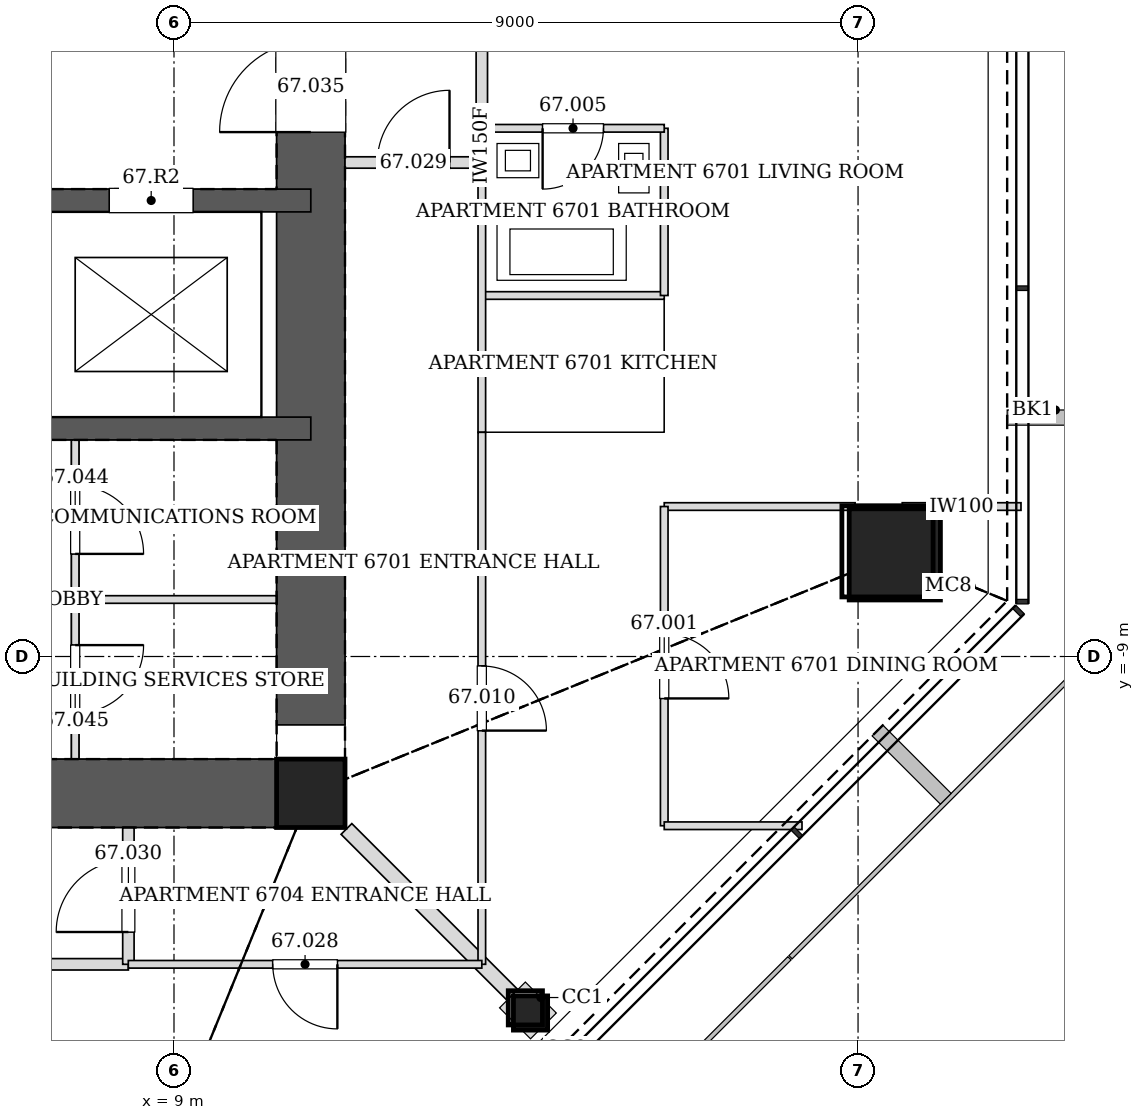
"""IFC4 building model, lengths in metres.
Left out: names, types, materials, properties, quantities, classifications, styles, units other than length and angle.
Written with IfcOpenShell. Run it as: python <this file> out.ifc"""

import sys

from ifc_helpers import new_model, si_unit, direction, frame, frame_2d, origin, origin_2d, place, context, subcontext, project, spatial, rectangle, hollow_rectangle, extrude, element, fill, save


model = new_model("IFC4")
c1 = context("Model", 3, precision=1e-05, world=origin(), true_north=direction((0.0, 1.0)))
c2 = subcontext(c1, "Body", "Model", "MODEL_VIEW")
j1 = project(units=[si_unit("LENGTHUNIT", "METRE"), si_unit("PLANEANGLEUNIT", "RADIAN")], contexts=[c1])
p1 = place(None, origin())
s1 = spatial("IfcSite", under=j1, at=p1, CompositionType="ELEMENT")
p2 = place(p1, origin())
s2 = spatial("IfcBuilding", under=s1, at=p2, CompositionType="ELEMENT")
p3 = place(p2, frame((0.0, 0.0, 277.6)))
s3 = spatial("IfcBuildingStorey", under=s2, at=p3, CompositionType="ELEMENT", Elevation=277.6)
p4 = place(p3, frame((18.484, -7.656, 0.0), z_axis=(-0.028279126691, 0.011771007049, 0.999530757099), x_axis=(-0.3842825994, -0.923215513192, 0.0)))
e1 = element("IfcColumn", 1, at=p4, inside=s3, PredefinedType="COLUMN", context=c2, shape_type="SweptSolid", body=[
    extrude(hollow_rectangle(XDim=1.2, YDim=1.2, WallThickness=0.055, at=origin_2d()), origin(), (0.0, 0.0, 1.0), 3.402),
])
p5 = place(p3, frame((13.691, -13.691, 0.0), z_axis=(-0.020026431307, 0.020026431307, 0.999598861593), x_axis=(-0.707106781187, -0.707106781187, 0.0)))
e2 = element("IfcColumn", 2, at=p5, inside=s3, PredefinedType="COLUMN", context=c2, shape_type="SweptSolid", body=[
    extrude(hollow_rectangle(XDim=0.45, YDim=0.45, WallThickness=0.02, at=origin_2d()), origin(), (0.0, 0.0, 1.0), 3.401),
])
p6 = place(p3, frame((10.8, -10.8, 0.0), z_axis=(0.0, 0.0, 1.0), x_axis=(1.0, 0.0, 0.0)))
e3 = element("IfcColumn", 3, at=p6, inside=s3, PredefinedType="COLUMN", context=c2, shape_type="SweptSolid", body=[
    extrude(hollow_rectangle(XDim=0.9, YDim=0.9, WallThickness=0.04, at=origin_2d()), origin(), (0.0, 0.0, 1.0), 3.4),
])
p7 = place(p3, frame((-10.8, -10.8, 0.0), z_axis=(0.0, 0.0, 1.0), x_axis=(1.0, 0.0, 0.0)))
e4 = element("IfcWall", 4, at=p7, inside=s3, PredefinedType="SOLIDWALL", context=c2, shape_type="SweptSolid", body=[
    extrude(rectangle(XDim=21.6, YDim=0.9, at=frame_2d((10.8, 0.0))), origin(), (0.0, 0.0, 1.0), 3.4),
])
p8 = place(p7, frame((10.05, 0.0, 0.0)))
e5 = element("IfcOpeningElement", 5, at=p8, cuts=e4, PredefinedType="OPENING", context=c2, shape_type="SweptSolid", body=[
    extrude(rectangle(XDim=1.5, YDim=2.1, at=frame_2d((0.75, 1.05))), frame((0.0, 0.46, 0.0), z_axis=(0.0, -1.0, 0.0), x_axis=(1.0, 0.0, 0.0)), (0.0, 0.0, 1.0), 0.92),
])
p9 = place(p7, frame((17.1, 0.0, 0.0)))
e6 = element("IfcOpeningElement", 6, at=p9, cuts=e4, PredefinedType="OPENING", context=c2, shape_type="SweptSolid", body=[
    extrude(rectangle(XDim=0.9, YDim=2.1, at=frame_2d((0.45, 1.05))), frame((0.0, 0.46, 0.0), z_axis=(0.0, -1.0, 0.0), x_axis=(1.0, 0.0, 0.0)), (0.0, 0.0, 1.0), 0.92),
])
p10 = place(p3, frame((10.8, -10.8, 0.0), z_axis=(0.0, 0.0, 1.0), x_axis=(0.0, 1.0, 0.0)))
e7 = element("IfcWall", 7, at=p10, inside=s3, PredefinedType="SOLIDWALL", context=c2, shape_type="SweptSolid", body=[
    extrude(rectangle(XDim=21.6, YDim=0.9, at=frame_2d((10.8, 0.0))), origin(), (0.0, 0.0, 1.0), 3.4),
])
p11 = place(p10, frame((11.7, 0.0, 0.0)))
e8 = element("IfcOpeningElement", 8, at=p11, cuts=e7, PredefinedType="OPENING", context=c2, shape_type="SweptSolid", body=[
    extrude(rectangle(XDim=1.2, YDim=2.1, at=frame_2d((0.6, 1.05))), frame((0.0, 0.46, 0.0), z_axis=(0.0, -1.0, 0.0), x_axis=(1.0, 0.0, 0.0)), (0.0, 0.0, 1.0), 0.92),
])
p12 = place(p10, frame((8.7, 0.0, 0.0)))
e9 = element("IfcOpeningElement", 9, at=p12, cuts=e7, PredefinedType="OPENING", context=c2, shape_type="SweptSolid", body=[
    extrude(rectangle(XDim=1.2, YDim=2.1, at=frame_2d((0.6, 1.05))), frame((0.0, 0.46, 0.0), z_axis=(0.0, -1.0, 0.0), x_axis=(1.0, 0.0, 0.0)), (0.0, 0.0, 1.0), 0.92),
])
p13 = place(p3, frame((-10.8, -3.0, 0.0), z_axis=(0.0, 0.0, 1.0), x_axis=(1.0, 0.0, 0.0)))
e10 = element("IfcWall", 10, at=p13, inside=s3, PredefinedType="SOLIDWALL", context=c2, shape_type="SweptSolid", body=[
    extrude(rectangle(XDim=21.6, YDim=0.3, at=frame_2d((10.8, 0.0))), origin(), (0.0, 0.0, 1.0), 3.4),
])
p14 = place(p13, frame((4.55, 0.0, 0.0)))
e11 = element("IfcOpeningElement", 11, at=p14, cuts=e10, PredefinedType="OPENING", context=c2, shape_type="SweptSolid", body=[
    extrude(rectangle(XDim=0.9, YDim=2.1, at=frame_2d((0.45, 1.05))), frame((0.0, 0.16, 0.0), z_axis=(0.0, -1.0, 0.0), x_axis=(1.0, 0.0, 0.0)), (0.0, 0.0, 1.0), 0.32),
])
p15 = place(p13, frame((7.45, 0.0, 0.0)))
e12 = element("IfcOpeningElement", 12, at=p15, cuts=e10, PredefinedType="OPENING", context=c2, shape_type="SweptSolid", body=[
    extrude(rectangle(XDim=0.9, YDim=2.1, at=frame_2d((0.45, 1.05))), frame((0.0, 0.16, 0.0), z_axis=(0.0, -1.0, 0.0), x_axis=(1.0, 0.0, 0.0)), (0.0, 0.0, 1.0), 0.32),
])
p16 = place(p13, frame((1.65, 0.0, 0.0)))
e13 = element("IfcOpeningElement", 13, at=p16, cuts=e10, PredefinedType="OPENING", context=c2, shape_type="SweptSolid", body=[
    extrude(rectangle(XDim=0.9, YDim=2.1, at=frame_2d((0.45, 1.05))), frame((0.0, 0.16, 0.0), z_axis=(0.0, -1.0, 0.0), x_axis=(1.0, 0.0, 0.0)), (0.0, 0.0, 1.0), 0.32),
])
p17 = place(p13, frame((13.25, 0.0, 0.0)))
e14 = element("IfcOpeningElement", 14, at=p17, cuts=e10, PredefinedType="OPENING", context=c2, shape_type="SweptSolid", body=[
    extrude(rectangle(XDim=0.9, YDim=2.1, at=frame_2d((0.45, 1.05))), frame((0.0, 0.16, 0.0), z_axis=(0.0, -1.0, 0.0), x_axis=(1.0, 0.0, 0.0)), (0.0, 0.0, 1.0), 0.32),
])
p18 = place(p13, frame((16.05, 0.0, 0.0)))
e15 = element("IfcOpeningElement", 15, at=p18, cuts=e10, PredefinedType="OPENING", context=c2, shape_type="SweptSolid", body=[
    extrude(rectangle(XDim=1.1, YDim=2.1, at=frame_2d((0.55, 1.05))), frame((0.0, 0.16, 0.0), z_axis=(0.0, -1.0, 0.0), x_axis=(1.0, 0.0, 0.0)), (0.0, 0.0, 1.0), 0.32),
])
p19 = place(p13, frame((18.95, 0.0, 0.0)))
e16 = element("IfcOpeningElement", 16, at=p19, cuts=e10, PredefinedType="OPENING", context=c2, shape_type="SweptSolid", body=[
    extrude(rectangle(XDim=1.1, YDim=2.1, at=frame_2d((0.55, 1.05))), frame((0.0, 0.16, 0.0), z_axis=(0.0, -1.0, 0.0), x_axis=(1.0, 0.0, 0.0)), (0.0, 0.0, 1.0), 0.32),
])
p20 = place(p3, frame((-10.8, -6.0, 0.0), z_axis=(0.0, 0.0, 1.0), x_axis=(1.0, 0.0, 0.0)))
e17 = element("IfcWall", 17, at=p20, inside=s3, PredefinedType="SOLIDWALL", context=c2, shape_type="SweptSolid", body=[
    extrude(rectangle(XDim=21.6, YDim=0.3, at=frame_2d((10.8, 0.0))), origin(), (0.0, 0.0, 1.0), 3.4),
])
p21 = place(p20, frame((10.25, 0.0, 0.0)))
e18 = element("IfcOpeningElement", 18, at=p21, cuts=e17, PredefinedType="OPENING", context=c2, shape_type="SweptSolid", body=[
    extrude(rectangle(XDim=1.1, YDim=2.1, at=frame_2d((0.55, 1.05))), frame((0.0, 0.16, 0.0), z_axis=(0.0, -1.0, 0.0), x_axis=(1.0, 0.0, 0.0)), (0.0, 0.0, 1.0), 0.32),
])
p22 = place(p3, frame((13.05, -2.5, 0.0), z_axis=(0.0, 0.0, 1.0), x_axis=(0.0, 1.0, 0.0)))
e19 = element("IfcWall", 19, at=p22, inside=s3, PredefinedType="PARTITIONING", context=c2, shape_type="SweptSolid", body=[
    extrude(rectangle(XDim=0.451, YDim=0.15, at=frame_2d((0.226, 0.0))), origin(), (0.0, 0.0, 1.0), 3.2),
])
p23 = place(p3, frame((13.05, -2.051, 0.0), z_axis=(0.0, 0.0, 1.0), x_axis=(0.0, 1.0, 0.0)))
e20 = element("IfcWall", 20, at=p23, inside=s3, PredefinedType="PARTITIONING", context=c2, shape_type="SweptSolid", body=[
    extrude(rectangle(XDim=9.602, YDim=0.15, at=frame_2d((4.801, 0.0))), origin(), (0.0, 0.0, 1.0), 2.344),
])
p24 = place(p3, frame((11.25, -2.5, 0.0), z_axis=(0.0, 0.0, 1.0), x_axis=(1.0, 0.0, 0.0)))
e21 = element("IfcWall", 21, at=p24, inside=s3, PredefinedType="PARTITIONING", context=c2, shape_type="SweptSolid", body=[
    extrude(rectangle(XDim=1.8, YDim=0.15, at=frame_2d((0.9, 0.0))), origin(), (0.0, 0.0, 1.0), 3.2),
])
p25 = place(p24, frame((0.425, 0.0, 0.0)))
e22 = element("IfcOpeningElement", 22, at=p25, cuts=e21, PredefinedType="OPENING", context=c2, shape_type="SweptSolid", body=[
    extrude(rectangle(XDim=0.95, YDim=2.1, at=frame_2d((0.475, 1.05))), frame((0.0, 0.085, 0.0), z_axis=(0.0, -1.0, 0.0), x_axis=(1.0, 0.0, 0.0)), (0.0, 0.0, 1.0), 0.17),
])
p26 = place(p3, frame((6.049, -13.05, 0.0), z_axis=(0.0, 0.0, 1.0), x_axis=(1.0, 0.0, 0.0)))
e23 = element("IfcWall", 23, at=p26, inside=s3, PredefinedType="PARTITIONING", context=c2, shape_type="SweptSolid", body=[
    extrude(rectangle(XDim=2.351, YDim=0.15, at=frame_2d((1.175, 0.0))), origin(), (0.0, 0.0, 1.0), 3.2),
])
p27 = place(p3, frame((8.4, -13.05, 0.0), z_axis=(0.0, 0.0, 1.0), x_axis=(0.0, 1.0, 0.0)))
e24 = element("IfcWall", 24, at=p27, inside=s3, PredefinedType="PARTITIONING", context=c2, shape_type="SweptSolid", body=[
    extrude(rectangle(XDim=1.8, YDim=0.15, at=frame_2d((0.9, 0.0))), origin(), (0.0, 0.0, 1.0), 3.2),
])
p28 = place(p27, frame((0.425, 0.0, 0.0)))
e25 = element("IfcOpeningElement", 25, at=p28, cuts=e24, PredefinedType="OPENING", context=c2, shape_type="SweptSolid", body=[
    extrude(rectangle(XDim=0.95, YDim=2.1, at=frame_2d((0.475, 1.05))), frame((0.0, 0.085, 0.0), z_axis=(0.0, -1.0, 0.0), x_axis=(1.0, 0.0, 0.0)), (0.0, 0.0, 1.0), 0.17),
])
p29 = place(p3, frame((20.144, -7.027, 0.0), z_axis=(0.0, 0.0, 1.0), x_axis=(-1.0, 0.0, 0.0)))
e26 = element("IfcWall", 26, at=p29, inside=s3, PredefinedType="PARTITIONING", context=c2, shape_type="SweptSolid", body=[
    extrude(rectangle(XDim=1.562, YDim=0.1, at=frame_2d((0.781, 0.0))), origin(), (0.0, 0.0, 1.0), 3.2),
])
p30 = place(p3, frame((17.961, -7.027, 0.0), z_axis=(0.0, 0.0, 1.0), x_axis=(-1.0, 0.0, 0.0)))
e27 = element("IfcWall", 27, at=p30, inside=s3, PredefinedType="PARTITIONING", context=c2, shape_type="SweptSolid", body=[
    extrude(rectangle(XDim=2.511, YDim=0.1, at=frame_2d((1.256, 0.0))), origin(), (0.0, 0.0, 1.0), 2.591),
])
p31 = place(p3, frame((15.45, -7.027, 0.0), z_axis=(0.0, 0.0, 1.0), x_axis=(0.0, -1.0, 0.0)))
e28 = element("IfcWall", 28, at=p31, inside=s3, PredefinedType="PARTITIONING", context=c2, shape_type="SweptSolid", body=[
    extrude(rectangle(XDim=4.2, YDim=0.1, at=frame_2d((2.1, 0.0))), origin(), (0.0, 0.0, 1.0), 2.428),
])
p32 = place(p31, frame((1.675, 0.0, 0.0)))
e29 = element("IfcOpeningElement", 29, at=p32, cuts=e28, PredefinedType="OPENING", context=c2, shape_type="SweptSolid", body=[
    extrude(rectangle(XDim=0.85, YDim=2.1, at=frame_2d((0.425, 1.05))), frame((0.0, 0.06, 0.0), z_axis=(0.0, -1.0, 0.0), x_axis=(1.0, 0.0, 0.0)), (0.0, 0.0, 1.0), 0.12),
])
p33 = place(p3, frame((15.45, -11.227, 0.0), z_axis=(0.0, 0.0, 1.0), x_axis=(1.0, 0.0, 0.0)))
e30 = element("IfcWall", 30, at=p33, inside=s3, PredefinedType="PARTITIONING", context=c2, shape_type="SweptSolid", body=[
    extrude(rectangle(XDim=1.813, YDim=0.1, at=frame_2d((0.906, 0.0))), origin(), (0.0, 0.0, 1.0), 2.74),
])
p34 = place(p3, frame((15.45, -4.25, 0.0), z_axis=(0.0, 0.0, 1.0), x_axis=(-1.0, 0.0, 0.0)))
e31 = element("IfcWall", 31, at=p34, inside=s3, PredefinedType="PARTITIONING", context=c2, shape_type="SweptSolid", body=[
    extrude(rectangle(XDim=2.4, YDim=0.1, at=frame_2d((1.2, 0.0))), origin(), (0.0, 0.0, 1.0), 2.591),
])
p35 = place(p3, frame((13.05, -6.05, 0.0), z_axis=(0.0, 0.0, 1.0), x_axis=(0.0, 1.0, 0.0)))
e32 = element("IfcWall", 32, at=p35, inside=s3, PredefinedType="PARTITIONING", context=c2, shape_type="SweptSolid", body=[
    extrude(rectangle(XDim=3.551, YDim=0.1, at=frame_2d((1.775, 0.0))), origin(), (0.0, 0.0, 1.0), 3.2),
])
p36 = place(p3, frame((15.45, -4.25, 0.0), z_axis=(0.0, 0.0, 1.0), x_axis=(0.0, 1.0, 0.0)))
e33 = element("IfcWall", 33, at=p36, inside=s3, PredefinedType="PARTITIONING", context=c2, shape_type="SweptSolid", body=[
    extrude(rectangle(XDim=2.2, YDim=0.1, at=frame_2d((1.1, 0.0))), origin(), (0.0, 0.0, 1.0), 3.2),
])
p37 = place(p3, frame((15.45, -2.05, 0.0), z_axis=(0.0, 0.0, 1.0), x_axis=(-1.0, 0.0, 0.0)))
e34 = element("IfcWall", 34, at=p37, inside=s3, PredefinedType="PARTITIONING", context=c2, shape_type="SweptSolid", body=[
    extrude(rectangle(XDim=2.4, YDim=0.1, at=frame_2d((1.2, 0.0))), origin(), (0.0, 0.0, 1.0), 2.591),
])
p38 = place(p37, frame((0.8, 0.0, 0.0)))
e35 = element("IfcOpeningElement", 35, at=p38, cuts=e34, PredefinedType="OPENING", context=c2, shape_type="SweptSolid", body=[
    extrude(rectangle(XDim=0.8, YDim=2.1, at=frame_2d((0.4, 1.05))), frame((0.0, 0.06, 0.0), z_axis=(0.0, -1.0, 0.0), x_axis=(1.0, 0.0, 0.0)), (0.0, 0.0, 1.0), 0.12),
])
p39 = place(p3, frame((13.45, -13.45, 0.0), z_axis=(0.0, 0.0, 1.0), x_axis=(-0.707106781187, 0.707106781187, 0.0)))
e36 = element("IfcWall", 36, at=p39, inside=s3, PredefinedType="PARTITIONING", context=c2, shape_type="SweptSolid", body=[
    extrude(rectangle(XDim=3.085, YDim=0.2, at=frame_2d((1.542, 0.0))), origin(), (0.0, 0.0, 1.0), 2.591),
])
p40 = place(p3, frame((13.05, -6.05, 0.0), z_axis=(0.0, 0.0, 1.0), x_axis=(0.0, -1.0, 0.0)))
e37 = element("IfcWall", 37, at=p40, inside=s3, PredefinedType="PARTITIONING", context=c2, shape_type="SweptSolid", body=[
    extrude(rectangle(XDim=7.0, YDim=0.1, at=frame_2d((3.5, 0.0))), origin(), (0.0, 0.0, 1.0), 2.428),
])
p41 = place(p40, frame((3.075, 0.0, 0.0)))
e38 = element("IfcOpeningElement", 38, at=p41, cuts=e37, PredefinedType="OPENING", context=c2, shape_type="SweptSolid", body=[
    extrude(rectangle(XDim=0.85, YDim=2.1, at=frame_2d((0.425, 1.05))), frame((0.0, 0.06, 0.0), z_axis=(0.0, -1.0, 0.0), x_axis=(1.0, 0.0, 0.0)), (0.0, 0.0, 1.0), 0.12),
])
p42 = place(p3, frame((13.05, -13.05, 0.0), z_axis=(0.0, 0.0, 1.0), x_axis=(-1.0, 0.0, 0.0)))
e39 = element("IfcWall", 39, at=p42, inside=s3, PredefinedType="PARTITIONING", context=c2, shape_type="SweptSolid", body=[
    extrude(rectangle(XDim=4.651, YDim=0.1, at=frame_2d((2.326, 0.0))), origin(), (0.0, 0.0, 1.0), 2.428),
])
p43 = place(p42, frame((1.9, 0.0, 0.0)))
e40 = element("IfcOpeningElement", 40, at=p43, cuts=e39, PredefinedType="OPENING", context=c2, shape_type="SweptSolid", body=[
    extrude(rectangle(XDim=0.85, YDim=2.1, at=frame_2d((0.425, 1.05))), frame((0.0, 0.06, 0.0), z_axis=(0.0, -1.0, 0.0), x_axis=(1.0, 0.0, 0.0)), (0.0, 0.0, 1.0), 0.12),
])
p44 = place(p3, frame((7.7, -10.35, 0.0), z_axis=(0.0, 0.0, 1.0), x_axis=(0.0, 1.0, 0.0)))
e41 = element("IfcWall", 41, at=p44, inside=s3, PredefinedType="PARTITIONING", context=c2, shape_type="SweptSolid", body=[
    extrude(rectangle(XDim=4.2, YDim=0.1, at=frame_2d((2.1, 0.0))), origin(), (0.0, 0.0, 1.0), 3.2),
])
p45 = place(p44, frame((2.7, 0.0, 0.0)))
e42 = element("IfcOpeningElement", 42, at=p45, cuts=e41, PredefinedType="OPENING", context=c2, shape_type="SweptSolid", body=[
    extrude(rectangle(XDim=0.9, YDim=2.1, at=frame_2d((0.45, 1.05))), frame((0.0, 0.06, 0.0), z_axis=(0.0, -1.0, 0.0), x_axis=(1.0, 0.0, 0.0)), (0.0, 0.0, 1.0), 0.12),
])
p46 = place(p44, frame((0.6, 0.0, 0.0)))
e43 = element("IfcOpeningElement", 43, at=p46, cuts=e41, PredefinedType="OPENING", context=c2, shape_type="SweptSolid", body=[
    extrude(rectangle(XDim=0.9, YDim=2.1, at=frame_2d((0.45, 1.05))), frame((0.0, 0.06, 0.0), z_axis=(0.0, -1.0, 0.0), x_axis=(1.0, 0.0, 0.0)), (0.0, 0.0, 1.0), 0.12),
])
p47 = place(p3, frame((7.7, -8.25, 0.0), z_axis=(0.0, 0.0, 1.0), x_axis=(1.0, 0.0, 0.0)))
e44 = element("IfcWall", 44, at=p47, inside=s3, PredefinedType="PARTITIONING", context=c2, shape_type="SweptSolid", body=[
    extrude(rectangle(XDim=2.65, YDim=0.1, at=frame_2d((1.325, 0.0))), origin(), (0.0, 0.0, 1.0), 3.2),
])
p48 = place(p32, origin())
e45 = element("IfcDoor", 45, at=p48, inside=s3, OperationType="SINGLE_SWING_RIGHT", PredefinedType="DOOR", context=c2, shape_type="SweptSolid", body=[
    extrude(rectangle(XDim=0.85, YDim=2.1, at=frame_2d((0.425, 1.05))), frame((0.0, 0.025, 0.0), z_axis=(0.0, -1.0, 0.0), x_axis=(1.0, 0.0, 0.0)), (0.0, 0.0, 1.0), 0.05),
])
fill(e29, e45)
p49 = place(p38, origin())
e46 = element("IfcDoor", 46, at=p49, inside=s3, OperationType="SINGLE_SWING_RIGHT", PredefinedType="DOOR", context=c2, shape_type="SweptSolid", body=[
    extrude(rectangle(XDim=0.8, YDim=2.1, at=frame_2d((0.4, 1.05))), frame((0.0, 0.025, 0.0), z_axis=(0.0, -1.0, 0.0), x_axis=(1.0, 0.0, 0.0)), (0.0, 0.0, 1.0), 0.05),
])
fill(e35, e46)
p50 = place(p41, origin())
e47 = element("IfcDoor", 47, at=p50, inside=s3, OperationType="SINGLE_SWING_RIGHT", PredefinedType="DOOR", context=c2, shape_type="SweptSolid", body=[
    extrude(rectangle(XDim=0.85, YDim=2.1, at=frame_2d((0.425, 1.05))), frame((0.0, 0.025, 0.0), z_axis=(0.0, -1.0, 0.0), x_axis=(1.0, 0.0, 0.0)), (0.0, 0.0, 1.0), 0.05),
])
fill(e38, e47)
p51 = place(p43, origin())
e48 = element("IfcDoor", 48, at=p51, inside=s3, OperationType="SINGLE_SWING_LEFT", PredefinedType="DOOR", context=c2, shape_type="SweptSolid", body=[
    extrude(rectangle(XDim=0.85, YDim=2.1, at=frame_2d((0.425, 1.05))), frame((0.0, 0.025, 0.0), z_axis=(0.0, -1.0, 0.0), x_axis=(1.0, 0.0, 0.0)), (0.0, 0.0, 1.0), 0.05),
])
fill(e40, e48)
p52 = place(p25, origin())
e49 = element("IfcDoor", 49, at=p52, inside=s3, OperationType="SINGLE_SWING_RIGHT", PredefinedType="DOOR", context=c2, shape_type="SweptSolid", body=[
    extrude(rectangle(XDim=0.95, YDim=2.1, at=frame_2d((0.475, 1.05))), frame((0.0, 0.025, 0.0), z_axis=(0.0, -1.0, 0.0), x_axis=(1.0, 0.0, 0.0)), (0.0, 0.0, 1.0), 0.05),
])
fill(e22, e49)
p53 = place(p28, origin())
e50 = element("IfcDoor", 50, at=p53, inside=s3, OperationType="SINGLE_SWING_LEFT", PredefinedType="DOOR", context=c2, shape_type="SweptSolid", body=[
    extrude(rectangle(XDim=0.95, YDim=2.1, at=frame_2d((0.475, 1.05))), frame((0.0, 0.025, 0.0), z_axis=(0.0, -1.0, 0.0), x_axis=(1.0, 0.0, 0.0)), (0.0, 0.0, 1.0), 0.05),
])
fill(e25, e50)
p54 = place(p12, origin())
e51 = element("IfcDoor", 51, at=p54, inside=s3, OperationType="SINGLE_SWING_LEFT", PredefinedType="DOOR", context=c2, shape_type="SweptSolid", body=[
    extrude(rectangle(XDim=1.2, YDim=2.1, at=frame_2d((0.6, 1.05))), frame((0.0, 0.025, 0.0), z_axis=(0.0, -1.0, 0.0), x_axis=(1.0, 0.0, 0.0)), (0.0, 0.0, 1.0), 0.05),
])
fill(e9, e51)
p55 = place(p45, frame((0.9, 0.0, 0.0), z_axis=(0.0, 0.0, 1.0), x_axis=(-1.0, 0.0, 0.0)))
e52 = element("IfcDoor", 52, at=p55, inside=s3, OperationType="SINGLE_SWING_RIGHT", PredefinedType="DOOR", context=c2, shape_type="SweptSolid", body=[
    extrude(rectangle(XDim=0.9, YDim=2.1, at=frame_2d((0.45, 1.05))), frame((0.0, 0.025, 0.0), z_axis=(0.0, -1.0, 0.0), x_axis=(1.0, 0.0, 0.0)), (0.0, 0.0, 1.0), 0.05),
])
fill(e42, e52)
p56 = place(p46, frame((0.9, 0.0, 0.0), z_axis=(0.0, 0.0, 1.0), x_axis=(-1.0, 0.0, 0.0)))
e53 = element("IfcDoor", 53, at=p56, inside=s3, OperationType="SINGLE_SWING_LEFT", PredefinedType="DOOR", context=c2, shape_type="SweptSolid", body=[
    extrude(rectangle(XDim=0.9, YDim=2.1, at=frame_2d((0.45, 1.05))), frame((0.0, 0.025, 0.0), z_axis=(0.0, -1.0, 0.0), x_axis=(1.0, 0.0, 0.0)), (0.0, 0.0, 1.0), 0.05),
])
fill(e43, e53)
p57 = place(p19, origin())
e54 = element("IfcDoor", 54, at=p57, inside=s3, OperationType="DOUBLE_DOOR_SLIDING", PredefinedType="DOOR", context=c2, shape_type="SweptSolid", body=[
    extrude(rectangle(XDim=1.1, YDim=2.1, at=frame_2d((0.55, 1.05))), frame((0.0, 0.025, 0.0), z_axis=(0.0, -1.0, 0.0), x_axis=(1.0, 0.0, 0.0)), (0.0, 0.0, 1.0), 0.05),
])
fill(e16, e54)
save(model, sys.argv[1])
